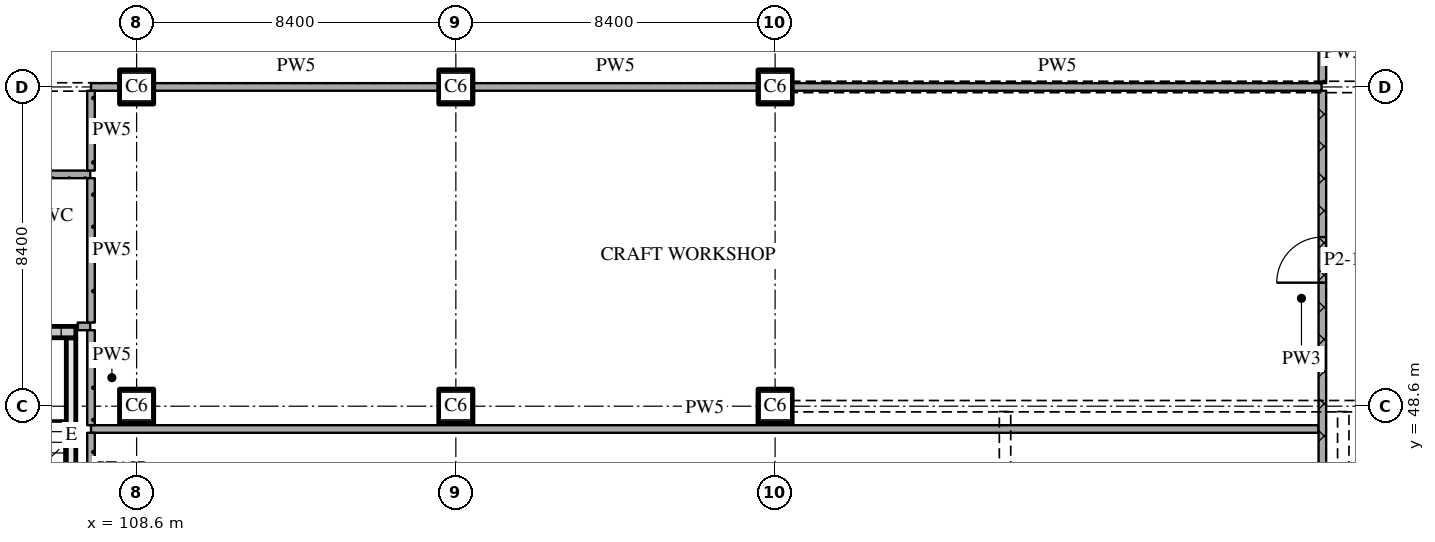
"""IFC4 building model, lengths in metres.
Left out: names, types, materials, properties, quantities, classifications, styles, units other than length and angle.
Written with IfcOpenShell. Run it as: python <this file> out.ifc"""

import sys

from ifc_helpers import new_model, si_unit, direction, frame, frame_2d, origin, origin_2d, place, context, subcontext, project, spatial, rectangle, extrude, element, fill, save


model = new_model("IFC4")
c1 = context("Model", 3, precision=1e-05, world=origin(), true_north=direction((0.0, 1.0)))
c2 = subcontext(c1, "Body", "Model", "MODEL_VIEW")
j1 = project(units=[si_unit("LENGTHUNIT", "METRE"), si_unit("PLANEANGLEUNIT", "RADIAN")], contexts=[c1])
p1 = place(None, origin())
s1 = spatial("IfcSite", under=j1, at=p1, CompositionType="ELEMENT")
p2 = place(p1, origin())
s2 = spatial("IfcBuilding", under=s1, at=p2, CompositionType="ELEMENT")
p3 = place(p2, frame((0.0, 0.0, 14.4)))
s3 = spatial("IfcBuildingStorey", under=s2, at=p3, CompositionType="ELEMENT", Elevation=14.4)
for number, where, z_axis, x_axis in (
    (1, (108.6, 48.6, 0.0), (0.0, 0.0, 1.0), (1.0, 0.0, 0.0)),
    (2, (108.6, 57.0, 0.0), (0.0, 0.0, 1.0), (1.0, 0.0, 0.0)),
    (3, (117.0, 48.6, 0.0), (0.0, 0.0, 1.0), (1.0, 0.0, 0.0)),
    (4, (117.0, 57.0, 0.0), (0.0, 0.0, 1.0), (1.0, 0.0, 0.0)),
    (5, (125.4, 48.6, 0.0), (0.0, 0.0, 1.0), (1.0, 0.0, 0.0)),
    (6, (125.4, 57.0, 0.0), (0.0, 0.0, 1.0), (1.0, 0.0, 0.0)),
):
    element("IfcColumn", number, at=place(p3, frame(where, z_axis=z_axis, x_axis=x_axis)), inside=s3, PredefinedType="COLUMN", context=c2, shape_type="SweptSolid", body=[
        extrude(rectangle(XDim=0.9, YDim=0.9, at=origin_2d()), origin(), (0.0, 0.0, 1.0), 4.8),
    ])
p4 = place(p3, frame((106.875, 43.5, 0.0), z_axis=(0.0, 0.0, 1.0), x_axis=(0.0, 1.0, 0.0)))
e7 = element("IfcWall", 7, at=p4, inside=s3, PredefinedType="SOLIDWALL", context=c2, shape_type="SweptSolid", body=[
    extrude(rectangle(XDim=6.9, YDim=0.25, at=frame_2d((3.45, 0.0))), origin(), (0.0, 0.0, 1.0), 4.5),
])
p5 = place(p3, frame((101.4, 50.55, 0.0), z_axis=(0.0, 0.0, 1.0), x_axis=(1.0, 0.0, 0.0)))
e8 = element("IfcWall", 8, at=p5, inside=s3, PredefinedType="SOLIDWALL", context=c2, shape_type="SweptSolid", body=[
    extrude(rectangle(XDim=5.6, YDim=0.3, at=frame_2d((2.8, 0.0))), origin(), (0.0, 0.0, 1.0), 4.5),
])
p6 = place(p3, frame((107.4, 48.0, 0.0), z_axis=(0.0, 0.0, 1.0), x_axis=(1.0, 0.0, 0.0)))
e9 = element("IfcWall", 9, at=p6, inside=s3, PredefinedType="PARTITIONING", context=c2, shape_type="SweptSolid", body=[
    extrude(rectangle(XDim=32.3, YDim=0.2, at=frame_2d((16.15, 0.0))), origin(), (0.0, 0.0, 1.0), 4.5),
])
p7 = place(p3, frame((107.05, 50.7, 0.0), z_axis=(0.0, 0.0, 1.0), x_axis=(1.0, 0.0, 0.0)))
e10 = element("IfcWall", 10, at=p7, inside=s3, PredefinedType="PARTITIONING", context=c2, shape_type="SweptSolid", body=[
    extrude(rectangle(XDim=0.33, YDim=0.2, at=frame_2d((0.165, 0.0))), origin(), (0.0, 0.0, 1.0), 4.5),
])
p8 = place(p3, frame((101.42, 54.7, 0.0), z_axis=(0.0, 0.0, 1.0), x_axis=(1.0, 0.0, 0.0)))
e11 = element("IfcWall", 11, at=p8, inside=s3, PredefinedType="PARTITIONING", context=c2, shape_type="SweptSolid", body=[
    extrude(rectangle(XDim=5.96, YDim=0.2, at=frame_2d((2.98, 0.0))), origin(), (0.0, 0.0, 1.0), 4.5),
])
p9 = place(p3, frame((107.4, 57.0, 0.0), z_axis=(0.0, 0.0, 1.0), x_axis=(1.0, 0.0, 0.0)))
e12 = element("IfcWall", 12, at=p9, inside=s3, PredefinedType="PARTITIONING", context=c2, shape_type="SweptSolid", body=[
    extrude(rectangle(XDim=0.73, YDim=0.2, at=frame_2d((0.365, 0.0))), origin(), (0.0, 0.0, 1.0), 3.9),
])
for number, where, z_axis, x_axis in (
    (13, (109.07, 57.0, 0.0), (0.0, 0.0, 1.0), (1.0, 0.0, 0.0)),
    (14, (117.47, 57.0, 0.0), (0.0, 0.0, 1.0), (1.0, 0.0, 0.0)),
):
    element("IfcWall", number, at=place(p3, frame(where, z_axis=z_axis, x_axis=x_axis)), inside=s3, PredefinedType="PARTITIONING", context=c2, shape_type="SweptSolid", body=[
        extrude(rectangle(XDim=7.46, YDim=0.2, at=frame_2d((3.73, 0.0))), origin(), (0.0, 0.0, 1.0), 4.5),
    ])
p10 = place(p3, frame((125.87, 57.0, 0.0), z_axis=(0.0, 0.0, 1.0), x_axis=(1.0, 0.0, 0.0)))
e15 = element("IfcWall", 15, at=p10, inside=s3, PredefinedType="PARTITIONING", context=c2, shape_type="SweptSolid", body=[
    extrude(rectangle(XDim=13.91, YDim=0.2, at=frame_2d((6.955, 0.0))), origin(), (0.0, 0.0, 1.0), 3.51),
])
p11 = place(p3, frame((107.4, 47.9, 0.0), z_axis=(0.0, 0.0, 1.0), x_axis=(0.0, -1.0, 0.0)))
e16 = element("IfcWall", 16, at=p11, inside=s3, PredefinedType="PARTITIONING", context=c2, shape_type="SweptSolid", body=[
    extrude(rectangle(XDim=4.6, YDim=0.2, at=frame_2d((2.3, 0.0))), origin(), (0.0, 0.0, 1.0), 4.5),
])
p12 = place(p3, frame((107.4, 50.6, 0.0), z_axis=(0.0, 0.0, 1.0), x_axis=(0.0, -1.0, 0.0)))
e17 = element("IfcWall", 17, at=p12, inside=s3, PredefinedType="PARTITIONING", context=c2, shape_type="SweptSolid", body=[
    extrude(rectangle(XDim=2.5, YDim=0.2, at=frame_2d((1.25, 0.0))), origin(), (0.0, 0.0, 1.0), 4.5),
])
p13 = place(p3, frame((107.4, 56.9, 0.0), z_axis=(0.0, 0.0, 1.0), x_axis=(0.0, -1.0, 0.0)))
e18 = element("IfcWall", 18, at=p13, inside=s3, PredefinedType="PARTITIONING", context=c2, shape_type="SweptSolid", body=[
    extrude(rectangle(XDim=2.1, YDim=0.2, at=frame_2d((1.05, 0.0))), origin(), (0.0, 0.0, 1.0), 4.5),
])
p14 = place(p3, frame((107.4, 54.6, 0.0), z_axis=(0.0, 0.0, 1.0), x_axis=(0.0, -1.0, 0.0)))
e19 = element("IfcWall", 19, at=p14, inside=s3, PredefinedType="PARTITIONING", context=c2, shape_type="SweptSolid", body=[
    extrude(rectangle(XDim=3.8, YDim=0.2, at=frame_2d((1.9, 0.0))), origin(), (0.0, 0.0, 1.0), 4.5),
])
p15 = place(p3, frame((139.8, 45.975, 0.0), z_axis=(0.0, 0.0, 1.0), x_axis=(0.0, 1.0, 0.0)))
e20 = element("IfcWall", 20, at=p15, inside=s3, PredefinedType="PARTITIONING", context=c2, shape_type="SweptSolid", body=[
    extrude(rectangle(XDim=10.925, YDim=0.2, at=frame_2d((5.462, 0.0))), origin(), (0.0, 0.0, 1.0), 4.5),
])
p16 = place(p15, frame((5.875, 0.0, 0.0)))
e21 = element("IfcOpeningElement", 21, at=p16, cuts=e20, PredefinedType="OPENING", context=c2, shape_type="SweptSolid", body=[
    extrude(rectangle(XDim=1.2, YDim=2.1, at=frame_2d((0.6, 1.05))), frame((0.0, 0.11, 0.0), z_axis=(0.0, -1.0, 0.0), x_axis=(1.0, 0.0, 0.0)), (0.0, 0.0, 1.0), 0.22),
])
p17 = place(p3, frame((139.8, 58.7, 0.0), z_axis=(0.0, 0.0, 1.0), x_axis=(0.0, -1.0, 0.0)))
e22 = element("IfcWall", 22, at=p17, inside=s3, PredefinedType="PARTITIONING", context=c2, shape_type="SweptSolid", body=[
    extrude(rectangle(XDim=1.6, YDim=0.2, at=frame_2d((0.8, 0.0))), origin(), (0.0, 0.0, 1.0), 4.5),
])
p18 = place(p16, origin())
e23 = element("IfcDoor", 23, at=p18, inside=s3, OperationType="SINGLE_SWING_LEFT", PredefinedType="DOOR", context=c2, shape_type="SweptSolid", body=[
    extrude(rectangle(XDim=1.2, YDim=2.1, at=frame_2d((0.6, 1.05))), frame((0.0, 0.025, 0.0), z_axis=(0.0, -1.0, 0.0), x_axis=(1.0, 0.0, 0.0)), (0.0, 0.0, 1.0), 0.05),
])
fill(e21, e23)
save(model, sys.argv[1])
